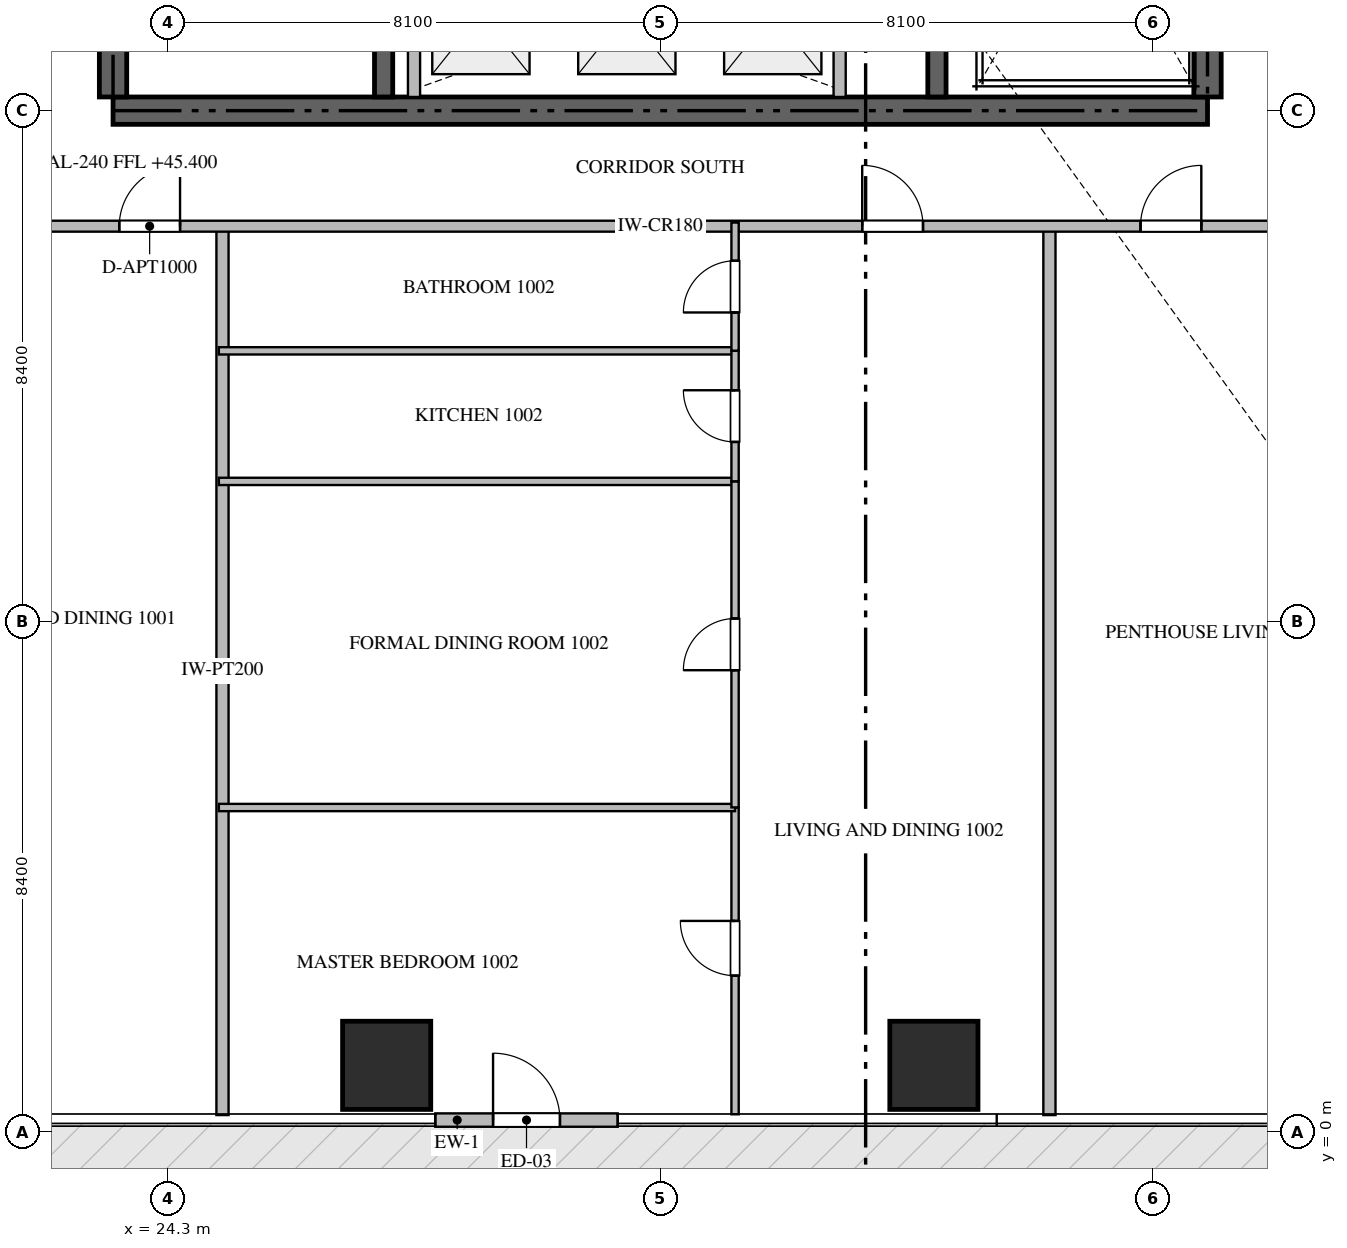
"""IFC4 building model, lengths in metres.
Left out: names, types, materials, properties, quantities, classifications, styles, units other than length and angle.
Written with IfcOpenShell. Run it as: python <this file> out.ifc"""

import sys

from ifc_helpers import new_model, si_unit, direction, frame, frame_2d, origin, origin_2d, place, context, subcontext, project, spatial, rectangle, extrude, source, transform, mapped, element, fill, save


model = new_model("IFC4")
c1 = context("Model", 3, precision=1e-05, world=origin(), true_north=direction((0.0, 1.0)))
c2 = subcontext(c1, "Body", "Model", "MODEL_VIEW")
j1 = project(units=[si_unit("LENGTHUNIT", "METRE"), si_unit("PLANEANGLEUNIT", "RADIAN")], contexts=[c1])
p1 = place(None, origin())
s1 = spatial("IfcSite", under=j1, at=p1, CompositionType="ELEMENT")
p2 = place(p1, origin())
s2 = spatial("IfcBuilding", under=s1, at=p2, CompositionType="ELEMENT")
p3 = place(p2, frame((0.0, 0.0, 45.45)))
s3 = spatial("IfcBuildingStorey", under=s2, at=p3, CompositionType="ELEMENT", Elevation=45.45)
p4 = place(p3, frame((23.4, 16.8, -0.26), z_axis=(0.0, 0.0, 1.0), x_axis=(1.0, 0.0, 0.0)))
e1 = element("IfcWall", 1, at=p4, inside=s3, PredefinedType="SHEAR", context=c2, shape_type="SweptSolid", body=[
    extrude(rectangle(XDim=18.0, YDim=0.45, at=frame_2d((9.0, 0.0))), origin(), (0.0, 0.0, 1.0), 3.748),
])
p5 = place(p3, frame((23.4, 17.025, -0.26), z_axis=(0.0, 0.0, 1.0), x_axis=(0.0, 1.0, 0.0)))
e2 = element("IfcWall", 2, at=p5, inside=s3, PredefinedType="SHEAR", context=c2, shape_type="SweptSolid", body=[
    extrude(rectangle(XDim=4.825, YDim=0.45, at=frame_2d((2.413, 0.0))), origin(), (0.0, 0.0, 1.0), 3.748),
])
p6 = place(p3, frame((41.4, 17.025, -0.26), z_axis=(0.0, 0.0, 1.0), x_axis=(0.0, 1.0, 0.0)))
e3 = element("IfcWall", 3, at=p6, inside=s3, PredefinedType="SHEAR", context=c2, shape_type="SweptSolid", body=[
    extrude(rectangle(XDim=8.325, YDim=0.45, at=frame_2d((4.163, 0.0))), origin(), (0.0, 0.0, 1.0), 3.748),
])
p7 = place(p3, frame((27.85, 17.025, -0.26), z_axis=(0.0, 0.0, 1.0), x_axis=(0.0, 1.0, 0.0)))
e4 = element("IfcWall", 4, at=p7, inside=s3, PredefinedType="SHEAR", context=c2, shape_type="SweptSolid", body=[
    extrude(rectangle(XDim=4.825, YDim=0.3, at=frame_2d((2.413, 0.0))), origin(), (0.0, 0.0, 1.0), 3.748),
])
p8 = place(p3, frame((36.95, 17.025, -0.26), z_axis=(0.0, 0.0, 1.0), x_axis=(0.0, 1.0, 0.0)))
e5 = element("IfcWall", 5, at=p8, inside=s3, PredefinedType="SHEAR", context=c2, shape_type="SweptSolid", body=[
    extrude(rectangle(XDim=8.325, YDim=0.3, at=frame_2d((4.163, 0.0))), origin(), (0.0, 0.0, 1.0), 3.748),
])
m1 = source(origin(), c2, "Body", "SweptSolid", [
    extrude(rectangle(XDim=1.45, YDim=1.45, at=origin_2d()), origin(), (0.0, 0.0, 1.0), 3.75),
])
for number, where, z_axis, x_axis in (
    (6, (27.9, 1.1, -0.26), (0.0, 0.0, 1.0), (1.0, 0.0, 0.0)),
    (7, (36.9, 1.1, -0.26), (0.0, 0.0, 1.0), (1.0, 0.0, 0.0)),
):
    element("IfcColumn", number, at=place(p3, frame(where, z_axis=z_axis, x_axis=x_axis)), inside=s3, PredefinedType="COLUMN", context=c2, shape_type="MappedRepresentation", body=[
        mapped(m1, transform((0.0, 0.0, 0.0), scale=1.0)),
    ])
p9 = place(p3, frame((28.7, 0.2, 0.0), z_axis=(0.0, 0.0, 1.0), x_axis=(1.0, 0.0, 0.0)))
e8 = element("IfcWall", 8, at=p9, inside=s3, PredefinedType="ELEMENTEDWALL", context=c2, shape_type="SweptSolid", body=[
    extrude(rectangle(XDim=3.0, YDim=0.22, at=frame_2d((1.5, 0.0))), origin(), (0.0, 0.0, 1.0), 3.475),
])
p10 = place(p9, frame((0.95, 0.0, 0.0)))
e9 = element("IfcOpeningElement", 9, at=p10, cuts=e8, PredefinedType="OPENING", context=c2, shape_type="SweptSolid", body=[
    extrude(rectangle(XDim=1.1, YDim=2.2, at=frame_2d((0.55, 1.1))), frame((0.0, 0.12, 0.0), z_axis=(0.0, -1.0, 0.0), x_axis=(1.0, 0.0, 0.0)), (0.0, 0.0, 1.0), 0.24),
])
for number, where, z_axis, x_axis in (
    (10, (28.35, 17.025, 0.0), (0.0, 0.0, 1.0), (0.0, 1.0, 0.0)),
    (11, (35.35, 17.025, 0.0), (0.0, 0.0, 1.0), (0.0, 1.0, 0.0)),
):
    element("IfcWall", number, at=place(p3, frame(where, z_axis=z_axis, x_axis=x_axis)), inside=s3, PredefinedType="STANDARD", context=c2, shape_type="SweptSolid", body=[
        extrude(rectangle(XDim=2.525, YDim=0.2, at=frame_2d((1.263, 0.0))), origin(), (0.0, 0.0, 1.0), 3.49),
    ])
for number, where, z_axis, x_axis in (
    (12, (25.2, 0.282, 0.0), (0.0, 0.0, 1.0), (0.0, 1.0, 0.0)),
    (13, (38.8, 0.282, 0.0), (0.0, 0.0, 1.0), (0.0, 1.0, 0.0)),
):
    element("IfcWall", number, at=place(p3, frame(where, z_axis=z_axis, x_axis=x_axis)), inside=s3, PredefinedType="PARTITIONING", context=c2, shape_type="SweptSolid", body=[
        extrude(rectangle(XDim=14.618, YDim=0.2, at=frame_2d((7.309, 0.0))), origin(), (0.0, 0.0, 1.0), 3.49),
    ])
p11 = place(p3, frame((21.402, 14.9, 0.0), z_axis=(0.0, 0.0, 1.0), x_axis=(1.0, 0.0, 0.0)))
e14 = element("IfcWall", 14, at=p11, inside=s3, PredefinedType="PARTITIONING", context=c2, shape_type="SweptSolid", body=[
    extrude(rectangle(XDim=21.996, YDim=0.18, at=frame_2d((10.998, 0.0))), origin(), (0.0, 0.0, 1.0), 3.49),
])
p12 = place(p11, frame((2.1, 0.0, 0.0)))
e15 = element("IfcOpeningElement", 15, at=p12, cuts=e14, PredefinedType="OPENING", context=c2, shape_type="SweptSolid", body=[
    extrude(rectangle(XDim=1.0, YDim=2.15, at=frame_2d((0.5, 1.075))), frame((0.0, 0.1, 0.0), z_axis=(0.0, -1.0, 0.0), x_axis=(1.0, 0.0, 0.0)), (0.0, 0.0, 1.0), 0.2),
])
p13 = place(p11, frame((14.319, 0.0, 0.0)))
e16 = element("IfcOpeningElement", 16, at=p13, cuts=e14, PredefinedType="OPENING", context=c2, shape_type="SweptSolid", body=[
    extrude(rectangle(XDim=1.0, YDim=2.15, at=frame_2d((0.5, 1.075))), frame((0.0, 0.1, 0.0), z_axis=(0.0, -1.0, 0.0), x_axis=(1.0, 0.0, 0.0)), (0.0, 0.0, 1.0), 0.2),
])
p14 = place(p11, frame((18.896, 0.0, 0.0)))
e17 = element("IfcOpeningElement", 17, at=p14, cuts=e14, PredefinedType="OPENING", context=c2, shape_type="SweptSolid", body=[
    extrude(rectangle(XDim=1.0, YDim=2.15, at=frame_2d((0.5, 1.075))), frame((0.0, 0.1, 0.0), z_axis=(0.0, -1.0, 0.0), x_axis=(1.0, 0.0, 0.0)), (0.0, 0.0, 1.0), 0.2),
])
p15 = place(p3, frame((33.63, 0.295, 0.0), z_axis=(0.0, 0.0, 1.0), x_axis=(0.0, 1.0, 0.0)))
e18 = element("IfcWall", 18, at=p15, inside=s3, PredefinedType="PARTITIONING", context=c2, shape_type="SweptSolid", body=[
    extrude(rectangle(XDim=5.045, YDim=0.12, at=frame_2d((2.522, 0.0))), origin(), (0.0, 0.0, 1.0), 3.49),
])
p16 = place(p15, frame((2.28, 0.0, 0.0)))
e19 = element("IfcOpeningElement", 19, at=p16, cuts=e18, PredefinedType="OPENING", context=c2, shape_type="SweptSolid", body=[
    extrude(rectangle(XDim=0.9, YDim=2.1, at=frame_2d((0.45, 1.05))), frame((0.0, 0.07, 0.0), z_axis=(0.0, -1.0, 0.0), x_axis=(1.0, 0.0, 0.0)), (0.0, 0.0, 1.0), 0.14),
])
for number, where, z_axis, x_axis in (
    (20, (25.14, 5.34, 0.0), (0.0, 0.0, 1.0), (1.0, 0.0, 0.0)),
    (21, (25.14, 10.703, 0.0), (0.0, 0.0, 1.0), (1.0, 0.0, 0.0)),
    (22, (25.14, 12.85, 0.0), (0.0, 0.0, 1.0), (1.0, 0.0, 0.0)),
):
    element("IfcWall", number, at=place(p3, frame(where, z_axis=z_axis, x_axis=x_axis)), inside=s3, PredefinedType="PARTITIONING", context=c2, shape_type="SweptSolid", body=[
        extrude(rectangle(XDim=8.49, YDim=0.12, at=frame_2d((4.245, 0.0))), origin(), (0.0, 0.0, 1.0), 3.49),
    ])
p17 = place(p3, frame((33.63, 5.342, 0.0), z_axis=(0.0, 0.0, 1.0), x_axis=(0.0, 1.0, 0.0)))
e23 = element("IfcWall", 23, at=p17, inside=s3, PredefinedType="PARTITIONING", context=c2, shape_type="SweptSolid", body=[
    extrude(rectangle(XDim=5.361, YDim=0.12, at=frame_2d((2.68, 0.0))), origin(), (0.0, 0.0, 1.0), 3.49),
])
p18 = place(p17, frame((2.256, 0.0, 0.0)))
e24 = element("IfcOpeningElement", 24, at=p18, cuts=e23, PredefinedType="OPENING", context=c2, shape_type="SweptSolid", body=[
    extrude(rectangle(XDim=0.85, YDim=2.1, at=frame_2d((0.425, 1.05))), frame((0.0, 0.07, 0.0), z_axis=(0.0, -1.0, 0.0), x_axis=(1.0, 0.0, 0.0)), (0.0, 0.0, 1.0), 0.14),
])
p19 = place(p3, frame((33.63, 10.705, 0.0), z_axis=(0.0, 0.0, 1.0), x_axis=(0.0, 1.0, 0.0)))
e25 = element("IfcWall", 25, at=p19, inside=s3, PredefinedType="PARTITIONING", context=c2, shape_type="SweptSolid", body=[
    extrude(rectangle(XDim=2.145, YDim=0.12, at=frame_2d((1.073, 0.0))), origin(), (0.0, 0.0, 1.0), 3.49),
])
p20 = place(p19, frame((0.647, 0.0, 0.0)))
e26 = element("IfcOpeningElement", 26, at=p20, cuts=e25, PredefinedType="OPENING", context=c2, shape_type="SweptSolid", body=[
    extrude(rectangle(XDim=0.85, YDim=2.1, at=frame_2d((0.425, 1.05))), frame((0.0, 0.07, 0.0), z_axis=(0.0, -1.0, 0.0), x_axis=(1.0, 0.0, 0.0)), (0.0, 0.0, 1.0), 0.14),
])
p21 = place(p3, frame((33.63, 12.852, 0.0), z_axis=(0.0, 0.0, 1.0), x_axis=(0.0, 1.0, 0.0)))
e27 = element("IfcWall", 27, at=p21, inside=s3, PredefinedType="PARTITIONING", context=c2, shape_type="SweptSolid", body=[
    extrude(rectangle(XDim=2.108, YDim=0.12, at=frame_2d((1.054, 0.0))), origin(), (0.0, 0.0, 1.0), 3.49),
])
p22 = place(p21, frame((0.629, 0.0, 0.0)))
e28 = element("IfcOpeningElement", 28, at=p22, cuts=e27, PredefinedType="OPENING", context=c2, shape_type="SweptSolid", body=[
    extrude(rectangle(XDim=0.85, YDim=2.1, at=frame_2d((0.425, 1.05))), frame((0.0, 0.07, 0.0), z_axis=(0.0, -1.0, 0.0), x_axis=(1.0, 0.0, 0.0)), (0.0, 0.0, 1.0), 0.14),
])
m2 = source(origin(), c2, "Body", "SweptSolid", [
    extrude(rectangle(XDim=1.1, YDim=2.2, at=frame_2d((0.55, 1.1))), frame((0.0, 0.025, 0.0), z_axis=(0.0, -1.0, 0.0), x_axis=(1.0, 0.0, 0.0)), (0.0, 0.0, 1.0), 0.05),
])
p23 = place(p10, origin())
e29 = element("IfcDoor", 29, at=p23, inside=s3, OperationType="SINGLE_SWING_LEFT", PredefinedType="DOOR", context=c2, shape_type="MappedRepresentation", body=[
    mapped(m2, transform((0.0, 0.0, 0.0), scale=1.0)),
])
fill(e9, e29)
m3 = source(origin(), c2, "Body", "SweptSolid", [
    extrude(rectangle(XDim=1.0, YDim=2.15, at=frame_2d((0.5, 1.075))), frame((0.0, 0.025, 0.0), z_axis=(0.0, -1.0, 0.0), x_axis=(1.0, 0.0, 0.0)), (0.0, 0.0, 1.0), 0.05),
])
p24 = place(p12, origin())
e30 = element("IfcDoor", 30, at=p24, inside=s3, OperationType="SINGLE_SWING_RIGHT", PredefinedType="DOOR", context=c2, shape_type="MappedRepresentation", body=[
    mapped(m3, transform((0.0, 0.0, 0.0), scale=1.0)),
])
fill(e15, e30)
p25 = place(p13, origin())
e31 = element("IfcDoor", 31, at=p25, inside=s3, OperationType="SINGLE_SWING_LEFT", PredefinedType="DOOR", context=c2, shape_type="MappedRepresentation", body=[
    mapped(m3, transform((0.0, 0.0, 0.0), scale=1.0)),
])
fill(e16, e31)
p26 = place(p14, origin())
e32 = element("IfcDoor", 32, at=p26, inside=s3, OperationType="SINGLE_SWING_RIGHT", PredefinedType="DOOR", context=c2, shape_type="MappedRepresentation", body=[
    mapped(m3, transform((0.0, 0.0, 0.0), scale=1.0)),
])
fill(e17, e32)
m4 = source(origin(), c2, "Body", "SweptSolid", [
    extrude(rectangle(XDim=0.9, YDim=2.1, at=frame_2d((0.45, 1.05))), frame((0.0, 0.025, 0.0), z_axis=(0.0, -1.0, 0.0), x_axis=(1.0, 0.0, 0.0)), (0.0, 0.0, 1.0), 0.05),
])
p27 = place(p16, origin())
e33 = element("IfcDoor", 33, at=p27, inside=s3, OperationType="SINGLE_SWING_RIGHT", PredefinedType="DOOR", context=c2, shape_type="MappedRepresentation", body=[
    mapped(m4, transform((0.0, 0.0, 0.0), scale=1.0)),
])
fill(e19, e33)
m5 = source(origin(), c2, "Body", "SweptSolid", [
    extrude(rectangle(XDim=0.85, YDim=2.1, at=frame_2d((0.425, 1.05))), frame((0.0, 0.025, 0.0), z_axis=(0.0, -1.0, 0.0), x_axis=(1.0, 0.0, 0.0)), (0.0, 0.0, 1.0), 0.05),
])
p28 = place(p18, origin())
e34 = element("IfcDoor", 34, at=p28, inside=s3, OperationType="SINGLE_SWING_LEFT", PredefinedType="DOOR", context=c2, shape_type="MappedRepresentation", body=[
    mapped(m5, transform((0.0, 0.0, 0.0), scale=1.0)),
])
fill(e24, e34)
p29 = place(p20, origin())
e35 = element("IfcDoor", 35, at=p29, inside=s3, OperationType="SINGLE_SWING_RIGHT", PredefinedType="DOOR", context=c2, shape_type="MappedRepresentation", body=[
    mapped(m5, transform((0.0, 0.0, 0.0), scale=1.0)),
])
fill(e26, e35)
p30 = place(p22, origin())
e36 = element("IfcDoor", 36, at=p30, inside=s3, OperationType="SINGLE_SWING_LEFT", PredefinedType="DOOR", context=c2, shape_type="MappedRepresentation", body=[
    mapped(m5, transform((0.0, 0.0, 0.0), scale=1.0)),
])
fill(e28, e36)
save(model, sys.argv[1])
